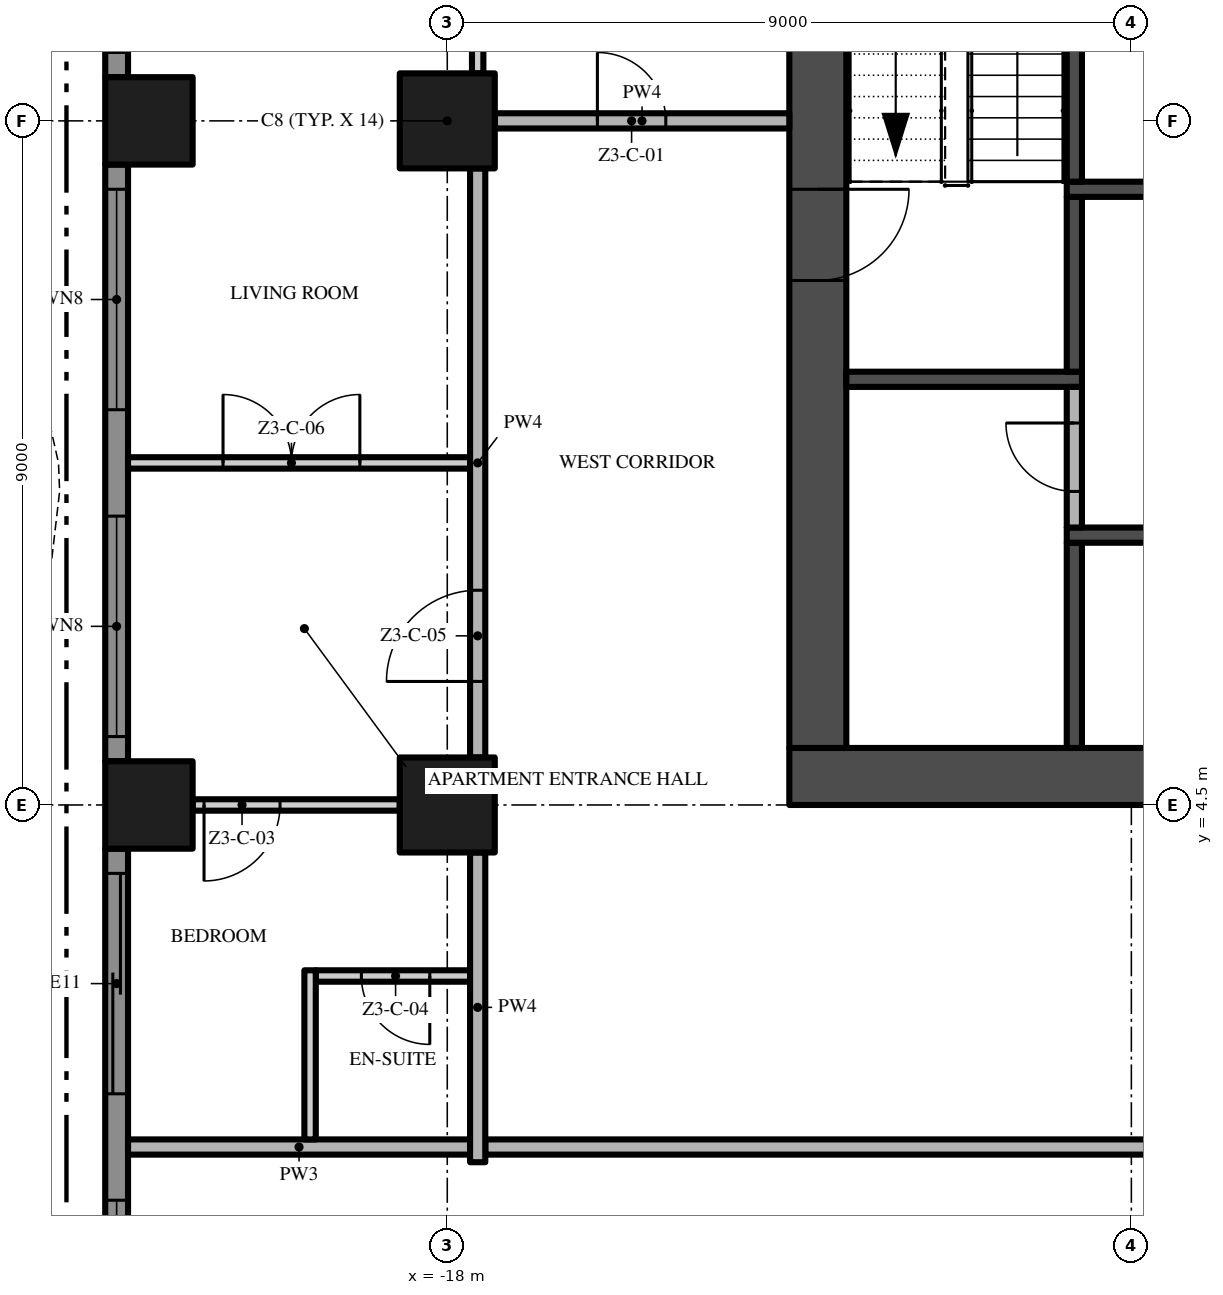
"""IFC4 building model, lengths in metres.
Left out: names, types, materials, properties, quantities, classifications, styles, units other than length and angle.
Written with IfcOpenShell. Run it as: python <this file> out.ifc"""

import sys

from ifc_helpers import new_model, si_unit, direction, frame, frame_2d, origin, origin_2d, place, context, subcontext, project, spatial, polyline, rectangle, outline, extrude, element, fill, save


model = new_model("IFC4")
c1 = context("Model", 3, precision=1e-05, world=origin(), true_north=direction((0.0, 1.0)))
c2 = subcontext(c1, "Body", "Model", "MODEL_VIEW")
j1 = project(units=[si_unit("LENGTHUNIT", "METRE"), si_unit("PLANEANGLEUNIT", "RADIAN")], contexts=[c1])
p1 = place(None, origin())
s1 = spatial("IfcSite", under=j1, at=p1, CompositionType="ELEMENT")
p2 = place(p1, origin())
s2 = spatial("IfcBuilding", under=s1, at=p2, CompositionType="ELEMENT")
p3 = place(p2, frame((0.0, 0.0, 147.8)))
s3 = spatial("IfcBuildingStorey", under=s2, at=p3, CompositionType="ELEMENT", Elevation=147.8)
p4 = place(p3, frame((-13.5, 4.875, -0.3), z_axis=(0.0, 0.0, 1.0), x_axis=(1.0, 0.0, 0.0)))
e1 = element("IfcWall", 1, at=p4, inside=s3, PredefinedType="SHEAR", context=c2, shape_type="SweptSolid", body=[
    extrude(rectangle(XDim=27.0, YDim=0.75, at=frame_2d((13.5, 0.0))), origin(), (0.0, 0.0, 1.0), 3.8),
])
p5 = place(p4, frame((12.0, 0.0, 0.3)))
e2 = element("IfcOpeningElement", 2, at=p5, cuts=e1, PredefinedType="OPENING", context=c2, shape_type="SweptSolid", body=[
    extrude(rectangle(XDim=3.0, YDim=2.4, at=frame_2d((1.5, 1.2))), frame((0.0, 0.385, 0.0), z_axis=(0.0, -1.0, 0.0), x_axis=(1.0, 0.0, 0.0)), (0.0, 0.0, 1.0), 0.77),
])
p6 = place(p4, frame((4.9, 0.0, 0.3)))
e3 = element("IfcOpeningElement", 3, at=p6, cuts=e1, PredefinedType="OPENING", context=c2, shape_type="SweptSolid", body=[
    extrude(rectangle(XDim=1.2, YDim=2.2, at=frame_2d((0.6, 1.1))), frame((0.0, 0.385, 0.0), z_axis=(0.0, -1.0, 0.0), x_axis=(1.0, 0.0, 0.0)), (0.0, 0.0, 1.0), 0.77),
])
p7 = place(p4, frame((20.75, 0.0, 0.3)))
e4 = element("IfcOpeningElement", 4, at=p7, cuts=e1, PredefinedType="OPENING", context=c2, shape_type="SweptSolid", body=[
    extrude(rectangle(XDim=1.5, YDim=2.2, at=frame_2d((0.75, 1.1))), frame((0.0, 0.385, 0.0), z_axis=(0.0, -1.0, 0.0), x_axis=(1.0, 0.0, 0.0)), (0.0, 0.0, 1.0), 0.77),
])
p8 = place(p4, frame((17.4, 0.0, 0.3)))
e5 = element("IfcOpeningElement", 5, at=p8, cuts=e1, PredefinedType="OPENING", context=c2, shape_type="SweptSolid", body=[
    extrude(rectangle(XDim=1.2, YDim=2.2, at=frame_2d((0.6, 1.1))), frame((0.0, 0.385, 0.0), z_axis=(0.0, -1.0, 0.0), x_axis=(1.0, 0.0, 0.0)), (0.0, 0.0, 1.0), 0.77),
])
p9 = place(p3, frame((-13.125, 21.75, -0.3), z_axis=(0.0, 0.0, 1.0), x_axis=(0.0, -1.0, 0.0)))
e6 = element("IfcWall", 6, at=p9, inside=s3, PredefinedType="SHEAR", context=c2, shape_type="SweptSolid", body=[
    extrude(rectangle(XDim=16.5, YDim=0.75, at=frame_2d((8.25, 0.0))), origin(), (0.0, 0.0, 1.0), 3.8),
])
p10 = place(p9, frame((9.15, 0.0, 0.3)))
e7 = element("IfcOpeningElement", 7, at=p10, cuts=e6, PredefinedType="OPENING", context=c2, shape_type="SweptSolid", body=[
    extrude(rectangle(XDim=1.2, YDim=2.2, at=frame_2d((0.6, 1.1))), frame((0.0, 0.385, 0.0), z_axis=(0.0, -1.0, 0.0), x_axis=(1.0, 0.0, 0.0)), (0.0, 0.0, 1.0), 0.77),
])
for number, where, z_axis, x_axis in (
    (8, (-18.0, 13.5, 0.0), (0.0, 0.0, 1.0), (1.0, 0.0, 0.0)),
    (9, (-18.0, 4.5, 0.0), (0.0, 0.0, 1.0), (1.0, 0.0, 0.0)),
):
    element("IfcColumn", number, at=place(p3, frame(where, z_axis=z_axis, x_axis=x_axis)), inside=s3, PredefinedType="COLUMN", context=c2, shape_type="SweptSolid", body=[
        extrude(rectangle(XDim=1.25, YDim=1.25, at=origin_2d()), origin(), (0.0, 0.0, 1.0), 3.5),
    ])
for number, where, z_axis, x_axis in (
    (10, (-21.925, 13.5, 0.0), (0.0, 0.0, 1.0), (1.0, 0.0, 0.0)),
    (11, (-21.925, 4.5, 0.0), (0.0, 0.0, 1.0), (1.0, 0.0, 0.0)),
):
    element("IfcColumn", number, at=place(p3, frame(where, z_axis=z_axis, x_axis=x_axis)), inside=s3, PredefinedType="COLUMN", context=c2, shape_type="SweptSolid", body=[
        extrude(rectangle(XDim=1.15, YDim=1.15, at=origin_2d()), origin(), (0.0, 0.0, 1.0), 3.5),
    ])
p11 = place(p3, frame((-22.35, 14.075, 0.0), z_axis=(0.0, 0.0, 1.0), x_axis=(0.0, 1.0, 0.0)))
e12 = element("IfcWall", 12, at=p11, inside=s3, PredefinedType="SOLIDWALL", context=c2, shape_type="SweptSolid", body=[
    extrude(rectangle(XDim=3.625, YDim=0.3, at=frame_2d((1.812, 0.0))), origin(), (0.0, 0.0, 1.0), 3.5),
])
p12 = place(p11, frame((0.325, 0.0, 0.0)))
e13 = element("IfcOpeningElement", 13, at=p12, cuts=e12, PredefinedType="OPENING", context=c2, shape_type="SweptSolid", body=[
    extrude(rectangle(XDim=2.9, YDim=2.4, at=frame_2d((1.45, 1.2))), frame((0.0, 0.16, 0.0), z_axis=(0.0, -1.0, 0.0), x_axis=(1.0, 0.0, 0.0)), (0.0, 0.0, 1.0), 0.32),
])
p13 = place(p3, frame((-22.35, 5.075, 0.0), z_axis=(0.0, 0.0, 1.0), x_axis=(0.0, 1.0, 0.0)))
e14 = element("IfcWall", 14, at=p13, inside=s3, PredefinedType="SOLIDWALL", context=c2, shape_type="SweptSolid", body=[
    extrude(rectangle(XDim=7.85, YDim=0.3, at=frame_2d((3.925, 0.0))), origin(), (0.0, 0.0, 1.0), 3.5),
])
p14 = place(p13, frame((4.625, 0.0, 0.45)))
e15 = element("IfcOpeningElement", 15, at=p14, cuts=e14, PredefinedType="OPENING", context=c2, shape_type="SweptSolid", body=[
    extrude(rectangle(XDim=2.9, YDim=2.65, at=frame_2d((1.45, 1.325))), frame((0.0, 0.16, 0.0), z_axis=(0.0, -1.0, 0.0), x_axis=(1.0, 0.0, 0.0)), (0.0, 0.0, 1.0), 0.32),
])
p15 = place(p13, frame((0.325, 0.0, 0.45)))
e16 = element("IfcOpeningElement", 16, at=p15, cuts=e14, PredefinedType="OPENING", context=c2, shape_type="SweptSolid", body=[
    extrude(rectangle(XDim=2.9, YDim=2.65, at=frame_2d((1.45, 1.325))), frame((0.0, 0.16, 0.0), z_axis=(0.0, -1.0, 0.0), x_axis=(1.0, 0.0, 0.0)), (0.0, 0.0, 1.0), 0.32),
])
p16 = place(p3, frame((-22.35, -3.925, 0.0), z_axis=(0.0, 0.0, 1.0), x_axis=(0.0, 1.0, 0.0)))
e17 = element("IfcWall", 17, at=p16, inside=s3, PredefinedType="SOLIDWALL", context=c2, shape_type="SweptSolid", body=[
    extrude(rectangle(XDim=7.85, YDim=0.3, at=frame_2d((3.925, 0.0))), origin(), (0.0, 0.0, 1.0), 3.5),
])
p17 = place(p16, frame((4.625, 0.0, 0.0)))
e18 = element("IfcOpeningElement", 18, at=p17, cuts=e17, PredefinedType="OPENING", context=c2, shape_type="SweptSolid", body=[
    extrude(rectangle(XDim=2.9, YDim=2.4, at=frame_2d((1.45, 1.2))), frame((0.0, 0.16, 0.0), z_axis=(0.0, -1.0, 0.0), x_axis=(1.0, 0.0, 0.0)), (0.0, 0.0, 1.0), 0.32),
])
p18 = place(p16, frame((0.325, 0.0, 0.45)))
e19 = element("IfcOpeningElement", 19, at=p18, cuts=e17, PredefinedType="OPENING", context=c2, shape_type="SweptSolid", body=[
    extrude(rectangle(XDim=2.9, YDim=2.65, at=frame_2d((1.45, 1.325))), frame((0.0, 0.16, 0.0), z_axis=(0.0, -1.0, 0.0), x_axis=(1.0, 0.0, 0.0)), (0.0, 0.0, 1.0), 0.32),
])
p19 = place(p3, origin())
e20 = element("IfcWall", 20, at=p19, inside=s3, PredefinedType="USERDEFINED", context=c2, shape_type="SweptSolid", body=[
    extrude(outline(polyline([(-25.149, 18.0), (-25.485, 16.5), (-25.5, 16.125), (-25.369, 15.0), (-24.845, 13.5), (-24.112, 12.0), (-23.451, 10.5), (-23.115, 9.0), (-23.1, 8.625), (-23.231, 7.5), (-23.755, 6.0), (-24.488, 4.5), (-25.149, 3.0), (-25.485, 1.5), (-25.5, 1.125), (-25.369, 0.0), (-24.845, -1.5), (-24.112, -3.0), (-23.451, -4.5), (-23.115, -6.0), (-23.1, -6.375), (-23.231, -7.5), (-23.755, -9.0), (-24.488, -10.5), (-25.149, -12.0), (-25.485, -13.5), (-25.241, -13.555), (-24.91, -12.079), (-24.261, -10.605), (-23.524, -9.096), (-22.986, -7.556), (-22.849, -6.385), (-22.866, -5.967), (-23.213, -4.421), (-23.885, -2.895), (-24.614, -1.404), (-25.124, 0.056), (-25.249, 1.135), (-25.236, 1.467), (-24.91, 2.921), (-24.261, 4.395), (-23.524, 5.904), (-22.986, 7.444), (-22.849, 8.615), (-22.866, 9.033), (-23.213, 10.579), (-23.885, 12.105), (-24.614, 13.596), (-25.124, 15.056), (-25.249, 16.135), (-25.236, 16.467), (-24.905, 17.945), (-25.149, 18.0)])), origin(), (0.0, 0.0, 1.0), 0.9),
])
p20 = place(p3, frame((-12.75, 10.1, 0.0), z_axis=(0.0, 0.0, 1.0), x_axis=(1.0, 0.0, 0.0)))
e21 = element("IfcWall", 21, at=p20, inside=s3, PredefinedType="SHEAR", context=c2, shape_type="SweptSolid", body=[
    extrude(rectangle(XDim=3.1, YDim=0.2, at=frame_2d((1.55, 0.0))), origin(), (0.0, 0.0, 1.0), 3.5),
])
p21 = place(p3, frame((-9.75, 5.25, 0.0), z_axis=(0.0, 0.0, 1.0), x_axis=(0.0, 1.0, 0.0)))
e22 = element("IfcWall", 22, at=p21, inside=s3, PredefinedType="SHEAR", context=c2, shape_type="SweptSolid", body=[
    extrude(rectangle(XDim=2.7, YDim=0.2, at=frame_2d((1.35, 0.0))), origin(), (0.0, 0.0, 1.0), 3.5),
])
p22 = place(p3, frame((-9.85, 8.05, 0.0), z_axis=(0.0, 0.0, 1.0), x_axis=(1.0, 0.0, 0.0)))
e23 = element("IfcWall", 23, at=p22, inside=s3, PredefinedType="SHEAR", context=c2, shape_type="SweptSolid", body=[
    extrude(rectangle(XDim=8.35, YDim=0.2, at=frame_2d((4.175, 0.0))), origin(), (0.0, 0.0, 1.0), 3.5),
])
p23 = place(p3, frame((-9.75, 8.15, 0.0), z_axis=(0.0, 0.0, 1.0), x_axis=(0.0, 1.0, 0.0)))
e24 = element("IfcWall", 24, at=p23, inside=s3, PredefinedType="PARTITIONING", context=c2, shape_type="SweptSolid", body=[
    extrude(rectangle(XDim=1.85, YDim=0.2, at=frame_2d((0.925, 0.0))), origin(), (0.0, 0.0, 1.0), 3.5),
])
p24 = place(p23, frame((0.475, 0.0, 0.0)))
e25 = element("IfcOpeningElement", 25, at=p24, cuts=e24, PredefinedType="OPENING", context=c2, shape_type="SweptSolid", body=[
    extrude(rectangle(XDim=0.9, YDim=2.1, at=frame_2d((0.45, 1.05))), frame((0.0, 0.11, 0.0), z_axis=(0.0, -1.0, 0.0), x_axis=(1.0, 0.0, 0.0)), (0.0, 0.0, 1.0), 0.22),
])
p25 = place(p3, frame((-9.75, 10.2, 0.0), z_axis=(0.0, 0.0, 1.0), x_axis=(0.0, 1.0, 0.0)))
e26 = element("IfcWall", 26, at=p25, inside=s3, PredefinedType="SHEAR", context=c2, shape_type="SweptSolid", body=[
    extrude(rectangle(XDim=2.3, YDim=0.2, at=frame_2d((1.15, 0.0))), origin(), (0.0, 0.0, 1.0), 3.5),
])
p26 = place(p3, frame((-9.85, 12.6, 0.0), z_axis=(0.0, 0.0, 1.0), x_axis=(1.0, 0.0, 0.0)))
e27 = element("IfcWall", 27, at=p26, inside=s3, PredefinedType="SHEAR", context=c2, shape_type="SweptSolid", body=[
    extrude(rectangle(XDim=3.475, YDim=0.2, at=frame_2d((1.738, 0.0))), origin(), (0.0, 0.0, 1.0), 3.5),
])
p27 = place(p3, frame((-9.75, 12.7, 0.0), z_axis=(0.0, 0.0, 1.0), x_axis=(0.0, 1.0, 0.0)))
e28 = element("IfcWall", 28, at=p27, inside=s3, PredefinedType="SHEAR", context=c2, shape_type="SweptSolid", body=[
    extrude(rectangle(XDim=3.2, YDim=0.2, at=frame_2d((1.6, 0.0))), origin(), (0.0, 0.0, 1.0), 3.5),
])
p28 = place(p3, frame((17.5, 0.0, 0.0), z_axis=(0.0, 0.0, 1.0), x_axis=(-1.0, 0.0, 0.0)))
e29 = element("IfcWall", 29, at=p28, inside=s3, PredefinedType="PARTITIONING", context=c2, shape_type="SweptSolid", body=[
    extrude(rectangle(XDim=35.0, YDim=0.2, at=frame_2d((17.5, 0.0))), origin(), (0.0, 0.0, 1.0), 3.5),
])
p29 = place(p28, frame((16.75, 0.0, 0.0)))
e30 = element("IfcOpeningElement", 30, at=p29, cuts=e29, PredefinedType="OPENING", context=c2, shape_type="SweptSolid", body=[
    extrude(rectangle(XDim=1.5, YDim=2.4, at=frame_2d((0.75, 1.2))), frame((0.0, 0.11, 0.0), z_axis=(0.0, -1.0, 0.0), x_axis=(1.0, 0.0, 0.0)), (0.0, 0.0, 1.0), 0.22),
])
p30 = place(p3, frame((-22.2, 0.0, 0.0), z_axis=(0.0, 0.0, 1.0), x_axis=(1.0, 0.0, 0.0)))
e31 = element("IfcWall", 31, at=p30, inside=s3, PredefinedType="PARTITIONING", context=c2, shape_type="SweptSolid", body=[
    extrude(rectangle(XDim=4.5, YDim=0.2, at=frame_2d((2.25, 0.0))), origin(), (0.0, 0.0, 1.0), 3.5),
])
p31 = place(p3, frame((-17.7, 2.25, 0.0), z_axis=(0.0, 0.0, 1.0), x_axis=(-1.0, 0.0, 0.0)))
e32 = element("IfcWall", 32, at=p31, inside=s3, PredefinedType="PARTITIONING", context=c2, shape_type="SweptSolid", body=[
    extrude(rectangle(XDim=2.03, YDim=0.15, at=frame_2d((1.015, 0.0))), origin(), (0.0, 0.0, 1.0), 3.5),
])
p32 = place(p31, frame((0.53, 0.0, 0.0)))
e33 = element("IfcOpeningElement", 33, at=p32, cuts=e32, PredefinedType="OPENING", context=c2, shape_type="SweptSolid", body=[
    extrude(rectangle(XDim=0.9, YDim=2.1, at=frame_2d((0.45, 1.05))), frame((0.0, 0.085, 0.0), z_axis=(0.0, -1.0, 0.0), x_axis=(1.0, 0.0, 0.0)), (0.0, 0.0, 1.0), 0.17),
])
p33 = place(p3, frame((-18.625, 4.5, 0.0), z_axis=(0.0, 0.0, 1.0), x_axis=(-1.0, 0.0, 0.0)))
e34 = element("IfcWall", 34, at=p33, inside=s3, PredefinedType="PARTITIONING", context=c2, shape_type="SweptSolid", body=[
    extrude(rectangle(XDim=2.725, YDim=0.15, at=frame_2d((1.363, 0.0))), origin(), (0.0, 0.0, 1.0), 3.5),
])
p34 = place(p33, frame((1.575, 0.0, 0.0)))
e35 = element("IfcOpeningElement", 35, at=p34, cuts=e34, PredefinedType="OPENING", context=c2, shape_type="SweptSolid", body=[
    extrude(rectangle(XDim=1.0, YDim=2.4, at=frame_2d((0.5, 1.2))), frame((0.0, 0.085, 0.0), z_axis=(0.0, -1.0, 0.0), x_axis=(1.0, 0.0, 0.0)), (0.0, 0.0, 1.0), 0.17),
])
p35 = place(p3, frame((-22.2, 9.0, 0.0), z_axis=(0.0, 0.0, 1.0), x_axis=(1.0, 0.0, 0.0)))
e36 = element("IfcWall", 36, at=p35, inside=s3, PredefinedType="PARTITIONING", context=c2, shape_type="SweptSolid", body=[
    extrude(rectangle(XDim=4.5, YDim=0.15, at=frame_2d((2.25, 0.0))), origin(), (0.0, 0.0, 1.0), 3.5),
])
p36 = place(p35, frame((1.25, 0.0, 0.0)))
e37 = element("IfcOpeningElement", 37, at=p36, cuts=e36, PredefinedType="OPENING", context=c2, shape_type="SweptSolid", body=[
    extrude(rectangle(XDim=1.8, YDim=2.4, at=frame_2d((0.9, 1.2))), frame((0.0, 0.085, 0.0), z_axis=(0.0, -1.0, 0.0), x_axis=(1.0, 0.0, 0.0)), (0.0, 0.0, 1.0), 0.17),
])
p37 = place(p3, frame((-17.375, 13.5, 0.0), z_axis=(0.0, 0.0, 1.0), x_axis=(1.0, 0.0, 0.0)))
e38 = element("IfcWall", 38, at=p37, inside=s3, PredefinedType="PARTITIONING", context=c2, shape_type="SweptSolid", body=[
    extrude(rectangle(XDim=3.875, YDim=0.2, at=frame_2d((1.938, 0.0))), origin(), (0.0, 0.0, 1.0), 3.5),
])
p38 = place(p37, frame((1.35, 0.0, 0.0)))
e39 = element("IfcOpeningElement", 39, at=p38, cuts=e38, PredefinedType="OPENING", context=c2, shape_type="SweptSolid", body=[
    extrude(rectangle(XDim=0.9, YDim=2.1, at=frame_2d((0.45, 1.05))), frame((0.0, 0.11, 0.0), z_axis=(0.0, -1.0, 0.0), x_axis=(1.0, 0.0, 0.0)), (0.0, 0.0, 1.0), 0.22),
])
p39 = place(p3, frame((-19.805, 0.1, 0.0), z_axis=(0.0, 0.0, 1.0), x_axis=(0.0, 1.0, 0.0)))
e40 = element("IfcWall", 40, at=p39, inside=s3, PredefinedType="PARTITIONING", context=c2, shape_type="SweptSolid", body=[
    extrude(rectangle(XDim=2.225, YDim=0.15, at=frame_2d((1.113, 0.0))), origin(), (0.0, 0.0, 1.0), 3.5),
])
p40 = place(p3, frame((-17.6, -0.2, 0.0), z_axis=(0.0, 0.0, 1.0), x_axis=(0.0, 1.0, 0.0)))
e41 = element("IfcWall", 41, at=p40, inside=s3, PredefinedType="PARTITIONING", context=c2, shape_type="SweptSolid", body=[
    extrude(rectangle(XDim=4.075, YDim=0.2, at=frame_2d((2.038, 0.0))), origin(), (0.0, 0.0, 1.0), 3.5),
])
p41 = place(p3, frame((-17.6, 5.125, 0.0), z_axis=(0.0, 0.0, 1.0), x_axis=(0.0, 1.0, 0.0)))
e42 = element("IfcWall", 42, at=p41, inside=s3, PredefinedType="PARTITIONING", context=c2, shape_type="SweptSolid", body=[
    extrude(rectangle(XDim=7.75, YDim=0.2, at=frame_2d((3.875, 0.0))), origin(), (0.0, 0.0, 1.0), 3.5),
])
p42 = place(p41, frame((1.0, 0.0, 0.0)))
e43 = element("IfcOpeningElement", 43, at=p42, cuts=e42, PredefinedType="OPENING", context=c2, shape_type="SweptSolid", body=[
    extrude(rectangle(XDim=1.2, YDim=2.4, at=frame_2d((0.6, 1.2))), frame((0.0, 0.11, 0.0), z_axis=(0.0, -1.0, 0.0), x_axis=(1.0, 0.0, 0.0)), (0.0, 0.0, 1.0), 0.22),
])
p43 = place(p3, frame((-17.6, 14.125, 0.0), z_axis=(0.0, 0.0, 1.0), x_axis=(0.0, 1.0, 0.0)))
e44 = element("IfcWall", 44, at=p43, inside=s3, PredefinedType="PARTITIONING", context=c2, shape_type="SweptSolid", body=[
    extrude(rectangle(XDim=3.3, YDim=0.15, at=frame_2d((1.65, 0.0))), origin(), (0.0, 0.0, 1.0), 3.5),
])
p44 = place(p12, origin())
e45 = element("IfcDoor", 45, at=p44, inside=s3, OperationType="SINGLE_SWING_LEFT", PredefinedType="DOOR", context=c2, shape_type="SweptSolid", body=[
    extrude(rectangle(XDim=2.9, YDim=2.4, at=frame_2d((1.45, 1.2))), frame((0.0, 0.025, 0.0), z_axis=(0.0, -1.0, 0.0), x_axis=(1.0, 0.0, 0.0)), (0.0, 0.0, 1.0), 0.05),
])
fill(e13, e45)
p45 = place(p14, origin())
e46 = element("IfcWindow", 46, at=p45, inside=s3, PartitioningType="SINGLE_PANEL", PredefinedType="WINDOW", context=c2, shape_type="SweptSolid", body=[
    extrude(rectangle(XDim=2.9, YDim=2.65, at=frame_2d((1.45, 1.325))), frame((0.0, 0.03, 0.0), z_axis=(0.0, -1.0, 0.0), x_axis=(1.0, 0.0, 0.0)), (0.0, 0.0, 1.0), 0.06),
])
fill(e15, e46)
p46 = place(p15, origin())
e47 = element("IfcWindow", 47, at=p46, inside=s3, PartitioningType="SINGLE_PANEL", PredefinedType="WINDOW", context=c2, shape_type="SweptSolid", body=[
    extrude(rectangle(XDim=2.9, YDim=2.65, at=frame_2d((1.45, 1.325))), frame((0.0, 0.03, 0.0), z_axis=(0.0, -1.0, 0.0), x_axis=(1.0, 0.0, 0.0)), (0.0, 0.0, 1.0), 0.06),
])
fill(e16, e47)
p47 = place(p17, origin())
e48 = element("IfcDoor", 48, at=p47, inside=s3, OperationType="SINGLE_SWING_LEFT", PredefinedType="DOOR", context=c2, shape_type="SweptSolid", body=[
    extrude(rectangle(XDim=2.9, YDim=2.4, at=frame_2d((1.45, 1.2))), frame((0.0, 0.025, 0.0), z_axis=(0.0, -1.0, 0.0), x_axis=(1.0, 0.0, 0.0)), (0.0, 0.0, 1.0), 0.05),
])
fill(e18, e48)
p48 = place(p18, origin())
e49 = element("IfcWindow", 49, at=p48, inside=s3, PartitioningType="SINGLE_PANEL", PredefinedType="WINDOW", context=c2, shape_type="SweptSolid", body=[
    extrude(rectangle(XDim=2.9, YDim=2.65, at=frame_2d((1.45, 1.325))), frame((0.0, 0.03, 0.0), z_axis=(0.0, -1.0, 0.0), x_axis=(1.0, 0.0, 0.0)), (0.0, 0.0, 1.0), 0.06),
])
fill(e19, e49)
p49 = place(p10, frame((1.2, 0.0, 0.0), z_axis=(0.0, 0.0, 1.0), x_axis=(-1.0, 0.0, 0.0)))
e50 = element("IfcDoor", 50, at=p49, inside=s3, OperationType="SINGLE_SWING_RIGHT", PredefinedType="DOOR", context=c2, shape_type="SweptSolid", body=[
    extrude(rectangle(XDim=1.2, YDim=2.2, at=frame_2d((0.6, 1.1))), frame((0.0, 0.025, 0.0), z_axis=(0.0, -1.0, 0.0), x_axis=(1.0, 0.0, 0.0)), (0.0, 0.0, 1.0), 0.05),
])
fill(e7, e50)
p50 = place(p24, origin())
e51 = element("IfcDoor", 51, at=p50, inside=s3, OperationType="SINGLE_SWING_RIGHT", PredefinedType="DOOR", context=c2, shape_type="SweptSolid", body=[
    extrude(rectangle(XDim=0.9, YDim=2.1, at=frame_2d((0.45, 1.05))), frame((0.0, 0.025, 0.0), z_axis=(0.0, -1.0, 0.0), x_axis=(1.0, 0.0, 0.0)), (0.0, 0.0, 1.0), 0.05),
])
fill(e25, e51)
p51 = place(p38, origin())
e52 = element("IfcDoor", 52, at=p51, inside=s3, OperationType="SINGLE_SWING_LEFT", PredefinedType="DOOR", context=c2, shape_type="SweptSolid", body=[
    extrude(rectangle(XDim=0.9, YDim=2.1, at=frame_2d((0.45, 1.05))), frame((0.0, 0.025, 0.0), z_axis=(0.0, -1.0, 0.0), x_axis=(1.0, 0.0, 0.0)), (0.0, 0.0, 1.0), 0.05),
])
fill(e39, e52)
p52 = place(p34, origin())
e53 = element("IfcDoor", 53, at=p52, inside=s3, OperationType="SINGLE_SWING_RIGHT", PredefinedType="DOOR", context=c2, shape_type="SweptSolid", body=[
    extrude(rectangle(XDim=1.0, YDim=2.4, at=frame_2d((0.5, 1.2))), frame((0.0, 0.025, 0.0), z_axis=(0.0, -1.0, 0.0), x_axis=(1.0, 0.0, 0.0)), (0.0, 0.0, 1.0), 0.05),
])
fill(e35, e53)
p53 = place(p32, origin())
e54 = element("IfcDoor", 54, at=p53, inside=s3, OperationType="SINGLE_SWING_LEFT", PredefinedType="DOOR", context=c2, shape_type="SweptSolid", body=[
    extrude(rectangle(XDim=0.9, YDim=2.1, at=frame_2d((0.45, 1.05))), frame((0.0, 0.025, 0.0), z_axis=(0.0, -1.0, 0.0), x_axis=(1.0, 0.0, 0.0)), (0.0, 0.0, 1.0), 0.05),
])
fill(e33, e54)
p54 = place(p42, origin())
e55 = element("IfcDoor", 55, at=p54, inside=s3, OperationType="SINGLE_SWING_LEFT", PredefinedType="DOOR", context=c2, shape_type="SweptSolid", body=[
    extrude(rectangle(XDim=1.2, YDim=2.4, at=frame_2d((0.6, 1.2))), frame((0.0, 0.025, 0.0), z_axis=(0.0, -1.0, 0.0), x_axis=(1.0, 0.0, 0.0)), (0.0, 0.0, 1.0), 0.05),
])
fill(e43, e55)
p55 = place(p36, origin())
e56 = element("IfcDoor", 56, at=p55, inside=s3, OperationType="DOUBLE_DOOR_SINGLE_SWING", PredefinedType="DOOR", context=c2, shape_type="SweptSolid", body=[
    extrude(rectangle(XDim=1.8, YDim=2.4, at=frame_2d((0.9, 1.2))), frame((0.0, 0.025, 0.0), z_axis=(0.0, -1.0, 0.0), x_axis=(1.0, 0.0, 0.0)), (0.0, 0.0, 1.0), 0.05),
])
fill(e37, e56)
save(model, sys.argv[1])
